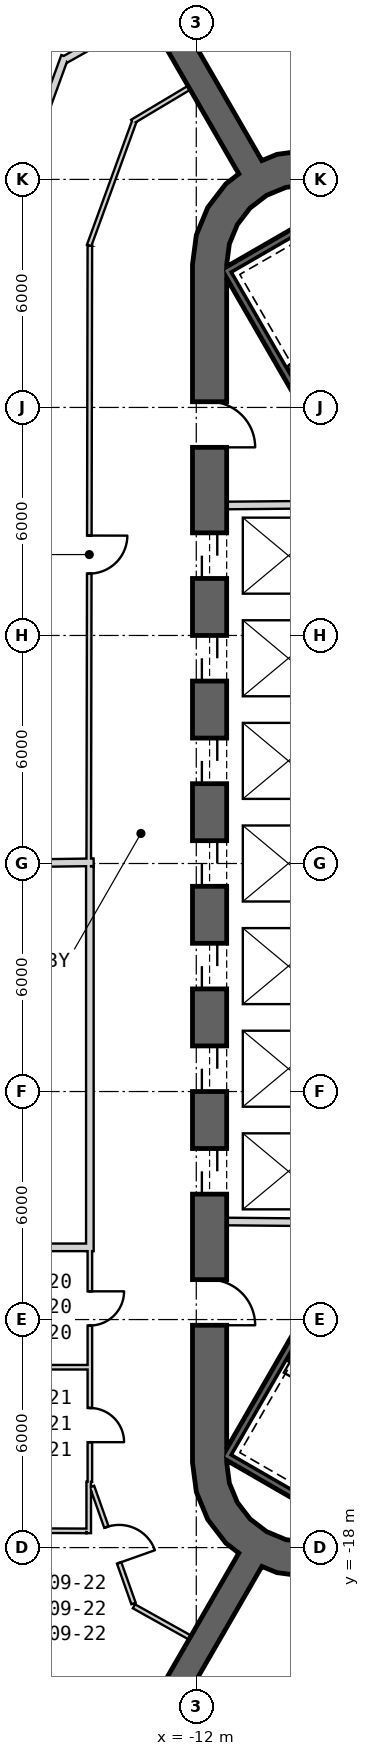
"""IFC4 building model, lengths in metres.
Left out: names, types, materials, properties, quantities, classifications, styles, units other than length and angle.
Written with IfcOpenShell. Run it as: python <this file> out.ifc"""

import sys

from ifc_helpers import new_model, si_unit, direction, frame, frame_2d, origin, place, context, subcontext, project, spatial, polyline, rectangle, outline, extrude, element, fill, save


model = new_model("IFC4")
c1 = context("Model", 3, precision=1e-05, world=origin(), true_north=direction((0.0, 1.0)))
c2 = subcontext(c1, "Body", "Model", "MODEL_VIEW")
j1 = project(units=[si_unit("LENGTHUNIT", "METRE"), si_unit("PLANEANGLEUNIT", "RADIAN")], contexts=[c1])
p1 = place(None, origin())
s1 = spatial("IfcSite", under=j1, at=p1, CompositionType="ELEMENT")
p2 = place(p1, origin())
s2 = spatial("IfcBuilding", under=s1, at=p2, CompositionType="ELEMENT")
p3 = place(p2, frame((0.0, 0.0, 169.2)))
s3 = spatial("IfcBuildingStorey", under=s2, at=p3, CompositionType="ELEMENT", Elevation=169.2)
p4 = place(p3, frame((-11.65, 15.762, 0.0), z_axis=(0.0, 0.0, 1.0), x_axis=(0.0, -1.0, 0.0)))
e1 = element("IfcWall", 1, at=p4, inside=s3, PredefinedType="SHEAR", context=c2, shape_type="SweptSolid", body=[
    extrude(rectangle(XDim=31.523, YDim=0.9, at=frame_2d((15.762, 0.0))), origin(), (0.0, 0.0, 1.0), 4.0),
])
p5 = place(p4, frame((7.062, 0.0, 0.0)))
e2 = element("IfcOpeningElement", 2, at=p5, cuts=e1, PredefinedType="OPENING", context=c2, shape_type="SweptSolid", body=[
    extrude(rectangle(XDim=1.2, YDim=2.4, at=frame_2d((0.6, 1.2))), frame((0.0, 0.46, 0.0), z_axis=(0.0, -1.0, 0.0), x_axis=(1.0, 0.0, 0.0)), (0.0, 0.0, 1.0), 0.92),
])
p6 = place(p4, frame((9.762, 0.0, 0.0)))
e3 = element("IfcOpeningElement", 3, at=p6, cuts=e1, PredefinedType="OPENING", context=c2, shape_type="SweptSolid", body=[
    extrude(rectangle(XDim=1.2, YDim=2.4, at=frame_2d((0.6, 1.2))), frame((0.0, 0.46, 0.0), z_axis=(0.0, -1.0, 0.0), x_axis=(1.0, 0.0, 0.0)), (0.0, 0.0, 1.0), 0.92),
])
p7 = place(p4, frame((12.462, 0.0, 0.0)))
e4 = element("IfcOpeningElement", 4, at=p7, cuts=e1, PredefinedType="OPENING", context=c2, shape_type="SweptSolid", body=[
    extrude(rectangle(XDim=1.2, YDim=2.4, at=frame_2d((0.6, 1.2))), frame((0.0, 0.46, 0.0), z_axis=(0.0, -1.0, 0.0), x_axis=(1.0, 0.0, 0.0)), (0.0, 0.0, 1.0), 0.92),
])
p8 = place(p4, frame((15.162, 0.0, 0.0)))
e5 = element("IfcOpeningElement", 5, at=p8, cuts=e1, PredefinedType="OPENING", context=c2, shape_type="SweptSolid", body=[
    extrude(rectangle(XDim=1.2, YDim=2.4, at=frame_2d((0.6, 1.2))), frame((0.0, 0.46, 0.0), z_axis=(0.0, -1.0, 0.0), x_axis=(1.0, 0.0, 0.0)), (0.0, 0.0, 1.0), 0.92),
])
p9 = place(p4, frame((17.862, 0.0, 0.0)))
e6 = element("IfcOpeningElement", 6, at=p9, cuts=e1, PredefinedType="OPENING", context=c2, shape_type="SweptSolid", body=[
    extrude(rectangle(XDim=1.2, YDim=2.4, at=frame_2d((0.6, 1.2))), frame((0.0, 0.46, 0.0), z_axis=(0.0, -1.0, 0.0), x_axis=(1.0, 0.0, 0.0)), (0.0, 0.0, 1.0), 0.92),
])
p10 = place(p4, frame((20.562, 0.0, 0.0)))
e7 = element("IfcOpeningElement", 7, at=p10, cuts=e1, PredefinedType="OPENING", context=c2, shape_type="SweptSolid", body=[
    extrude(rectangle(XDim=1.2, YDim=2.4, at=frame_2d((0.6, 1.2))), frame((0.0, 0.46, 0.0), z_axis=(0.0, -1.0, 0.0), x_axis=(1.0, 0.0, 0.0)), (0.0, 0.0, 1.0), 0.92),
])
p11 = place(p4, frame((23.262, 0.0, 0.0)))
e8 = element("IfcOpeningElement", 8, at=p11, cuts=e1, PredefinedType="OPENING", context=c2, shape_type="SweptSolid", body=[
    extrude(rectangle(XDim=1.2, YDim=2.4, at=frame_2d((0.6, 1.2))), frame((0.0, 0.46, 0.0), z_axis=(0.0, -1.0, 0.0), x_axis=(1.0, 0.0, 0.0)), (0.0, 0.0, 1.0), 0.92),
])
p12 = place(p4, frame((3.612, 0.0, 0.0)))
e9 = element("IfcOpeningElement", 9, at=p12, cuts=e1, PredefinedType="OPENING", context=c2, shape_type="SweptSolid", body=[
    extrude(rectangle(XDim=1.2, YDim=2.4, at=frame_2d((0.6, 1.2))), frame((0.0, 0.46, 0.0), z_axis=(0.0, -1.0, 0.0), x_axis=(1.0, 0.0, 0.0)), (0.0, 0.0, 1.0), 0.92),
])
p13 = place(p4, frame((26.712, 0.0, 0.0)))
e10 = element("IfcOpeningElement", 10, at=p13, cuts=e1, PredefinedType="OPENING", context=c2, shape_type="SweptSolid", body=[
    extrude(rectangle(XDim=1.2, YDim=2.4, at=frame_2d((0.6, 1.2))), frame((0.0, 0.46, 0.0), z_axis=(0.0, -1.0, 0.0), x_axis=(1.0, 0.0, 0.0)), (0.0, 0.0, 1.0), 0.92),
])
p14 = place(p3, origin())
e11 = element("IfcWall", 11, at=p14, inside=s3, PredefinedType="SHEAR", context=c2, shape_type="SweptSolid", body=[
    extrude(outline(polyline([(-7.6, 18.36), (-8.323, 18.659), (-9.1, 18.762), (-9.876, 18.659), (-10.6, 18.36), (-11.221, 17.883), (-11.698, 17.262), (-11.998, 16.538), (-12.1, 15.762), (-11.2, 15.762), (-11.128, 16.305), (-10.919, 16.812), (-10.585, 17.247), (-10.15, 17.58), (-9.644, 17.79), (-9.1, 17.862), (-8.556, 17.79), (-8.05, 17.58), (-7.6, 18.36)])), origin(), (0.0, 0.0, 1.0), 4.0),
])
p15 = place(p3, origin())
e12 = element("IfcWall", 12, at=p15, inside=s3, PredefinedType="SHEAR", context=c2, shape_type="SweptSolid", body=[
    extrude(outline(polyline([(-12.1, -15.762), (-11.998, -16.538), (-11.698, -17.262), (-11.221, -17.883), (-10.6, -18.36), (-9.876, -18.659), (-9.1, -18.762), (-8.323, -18.659), (-7.6, -18.36), (-8.05, -17.58), (-8.556, -17.79), (-9.1, -17.862), (-9.644, -17.79), (-10.15, -17.58), (-10.585, -17.247), (-10.919, -16.812), (-11.128, -16.305), (-11.2, -15.762), (-12.1, -15.762)])), origin(), (0.0, 0.0, 1.0), 4.0),
])
for number, where, z_axis, x_axis in (
    (13, (-10.575, 18.316, 0.0), (0.0, 0.0, 1.0), (-0.5, 0.866, 0.0)),
    (14, (-10.575, -18.316, 0.0), (0.0, 0.0, 1.0), (-0.5, -0.866, 0.0)),
):
    element("IfcWall", number, at=place(p3, frame(where, z_axis=z_axis, x_axis=x_axis)), inside=s3, PredefinedType="SHEAR", context=c2, shape_type="SweptSolid", body=[
        extrude(rectangle(XDim=12.433, YDim=0.7, at=frame_2d((6.216, 0.0))), origin(), (0.0, 0.0, 1.0), 4.0),
    ])
p16 = place(p3, frame((-11.2, 9.42, 0.0), z_axis=(0.0, 0.0, 1.0), x_axis=(0.999957167047, 0.009255488683, 0.0)))
e15 = element("IfcWall", 15, at=p16, inside=s3, PredefinedType="PLUMBINGWALL", context=c2, shape_type="SweptSolid", body=[
    extrude(rectangle(XDim=3.35, YDim=0.2, at=frame_2d((1.675, 0.0))), origin(), (0.0, 0.0, 1.0), 3.7),
])
p17 = place(p3, frame((-8.05, -9.449, 0.0), z_axis=(0.0, 0.0, 1.0), x_axis=(-0.999957467379, 0.009222983926, 0.0)))
e16 = element("IfcWall", 16, at=p17, inside=s3, PredefinedType="PLUMBINGWALL", context=c2, shape_type="SweptSolid", body=[
    extrude(rectangle(XDim=3.15, YDim=0.2, at=frame_2d((1.575, 0.0))), origin(), (0.0, 0.0, 1.0), 3.7),
])
p18 = place(p3, frame((-11.245, 15.678, -0.3), z_axis=(0.0, 0.0, 1.0), x_axis=(0.499977274689, -0.866038523851, 0.0)))
e17 = element("IfcWall", 17, at=p18, inside=s3, PredefinedType="SHEAR", context=c2, shape_type="SweptSolid", body=[
    extrude(rectangle(XDim=8.1, YDim=0.2, at=frame_2d((4.05, 0.0))), origin(), (0.0, 0.0, 1.0), 4.0),
])
for number, where, z_axis, x_axis in (
    (18, (-7.818, 17.541, -0.3), (0.0, 0.0, 1.0), (-0.866, -0.5, 0.0)),
    (19, (-11.282, -15.541, -0.3), (0.0, 0.0, 1.0), (0.866, -0.5, 0.0)),
):
    element("IfcWall", number, at=place(p3, frame(where, z_axis=z_axis, x_axis=x_axis)), inside=s3, PredefinedType="SHEAR", context=c2, shape_type="SweptSolid", body=[
        extrude(rectangle(XDim=3.8, YDim=0.2, at=frame_2d((1.9, 0.0))), origin(), (0.0, 0.0, 1.0), 4.0),
    ])
p19 = place(p3, frame((-7.196, -8.663, -0.3), z_axis=(0.0, 0.0, 1.0), x_axis=(-0.499997992926, -0.866026562566, 0.0)))
e20 = element("IfcWall", 20, at=p19, inside=s3, PredefinedType="SHEAR", context=c2, shape_type="SweptSolid", body=[
    extrude(rectangle(XDim=7.9, YDim=0.2, at=frame_2d((3.95, 0.0))), origin(), (0.0, 0.0, 1.0), 4.0),
])
p20 = place(p3, frame((-12.189, 20.411, 0.0), z_axis=(0.0, 0.0, 1.0), x_axis=(-0.858492721014, -0.51282574815, 0.0)))
e21 = element("IfcWall", 21, at=p20, inside=s3, PredefinedType="PARTITIONING", context=c2, shape_type="SweptSolid", body=[
    extrude(rectangle(XDim=1.742, YDim=0.12, at=frame_2d((0.871, 0.0))), origin(), (0.0, 0.0, 1.0), 3.7),
])
p21 = place(p3, frame((-13.631, 19.53, 0.0), z_axis=(0.0, 0.0, 1.0), x_axis=(-0.342069878069, -0.939674517329, 0.0)))
e22 = element("IfcWall", 22, at=p21, inside=s3, PredefinedType="PARTITIONING", context=c2, shape_type="SweptSolid", body=[
    extrude(rectangle(XDim=3.479, YDim=0.12, at=frame_2d((1.739, 0.0))), origin(), (0.0, 0.0, 1.0), 2.78),
])
p22 = place(p3, frame((-14.8, 16.257, 0.0), z_axis=(0.0, 0.0, 1.0), x_axis=(-0.001847148781, -0.999998294019, 0.0)))
e23 = element("IfcWall", 23, at=p22, inside=s3, PredefinedType="PARTITIONING", context=c2, shape_type="SweptSolid", body=[
    extrude(rectangle(XDim=16.257, YDim=0.12, at=frame_2d((8.128, 0.0))), origin(), (0.0, 0.0, 1.0), 2.88),
])
p23 = place(p22, frame((7.629, 0.0, 0.0)))
e24 = element("IfcOpeningElement", 24, at=p23, cuts=e23, PredefinedType="OPENING", context=c2, shape_type="SweptSolid", body=[
    extrude(rectangle(XDim=1.0, YDim=2.1, at=frame_2d((0.5, 1.05))), frame((0.0, 0.07, 0.0), z_axis=(0.0, -1.0, 0.0), x_axis=(1.0, 0.0, 0.0)), (0.0, 0.0, 1.0), 0.14),
])
p24 = place(p3, frame((-14.8, -10.13, 0.0), z_axis=(0.0, 0.0, 1.0), x_axis=(0.0, -1.0, 0.0)))
e25 = element("IfcWall", 25, at=p24, inside=s3, PredefinedType="PARTITIONING", context=c2, shape_type="SweptSolid", body=[
    extrude(rectangle(XDim=6.138, YDim=0.12, at=frame_2d((3.069, 0.0))), origin(), (0.0, 0.0, 1.0), 2.88),
])
p25 = place(p24, frame((1.127, 0.0, 0.0)))
e26 = element("IfcOpeningElement", 26, at=p25, cuts=e25, PredefinedType="OPENING", context=c2, shape_type="SweptSolid", body=[
    extrude(rectangle(XDim=0.9, YDim=2.1, at=frame_2d((0.45, 1.05))), frame((0.0, 0.07, 0.0), z_axis=(0.0, -1.0, 0.0), x_axis=(1.0, 0.0, 0.0)), (0.0, 0.0, 1.0), 0.14),
])
p26 = place(p24, frame((4.196, 0.0, 0.0)))
e27 = element("IfcOpeningElement", 27, at=p26, cuts=e25, PredefinedType="OPENING", context=c2, shape_type="SweptSolid", body=[
    extrude(rectangle(XDim=0.9, YDim=2.1, at=frame_2d((0.45, 1.05))), frame((0.0, 0.07, 0.0), z_axis=(0.0, -1.0, 0.0), x_axis=(1.0, 0.0, 0.0)), (0.0, 0.0, 1.0), 0.14),
])
p27 = place(p3, frame((-17.2, -0.001, 0.0), z_axis=(0.0, 0.0, 1.0), x_axis=(0.999915662945, 0.012987185857, 0.0)))
e28 = element("IfcWall", 28, at=p27, inside=s3, PredefinedType="PARTITIONING", context=c2, shape_type="SweptSolid", body=[
    extrude(rectangle(XDim=2.5, YDim=0.2, at=frame_2d((1.25, 0.0))), origin(), (0.0, 0.0, 1.0), 3.07),
])
p28 = place(p3, frame((-15.456, 21.239, 0.0), z_axis=(0.0, 0.0, 1.0), x_axis=(-0.34205546997, -0.939679762187, 0.0)))
e29 = element("IfcWall", 29, at=p28, inside=s3, PredefinedType="PARTITIONING", context=c2, shape_type="SweptSolid", body=[
    extrude(rectangle(XDim=4.706, YDim=0.2, at=frame_2d((2.353, 0.0))), origin(), (0.0, 0.0, 1.0), 2.78),
])
p29 = place(p3, frame((-13.313, 22.359, 0.0), z_axis=(0.0, 0.0, 1.0), x_axis=(-0.87121710687, -0.490897904555, 0.0)))
e30 = element("IfcWall", 30, at=p29, inside=s3, PredefinedType="PARTITIONING", context=c2, shape_type="SweptSolid", body=[
    extrude(rectangle(XDim=2.457, YDim=0.2, at=frame_2d((1.229, 0.0))), origin(), (0.0, 0.0, 1.0), 3.7),
])
p30 = place(p3, frame((-14.8, -0.07, 0.0), z_axis=(0.0, 0.0, 1.0), x_axis=(0.0, -1.0, 0.0)))
e31 = element("IfcWall", 31, at=p30, inside=s3, PredefinedType="PARTITIONING", context=c2, shape_type="SweptSolid", body=[
    extrude(rectangle(XDim=10.13, YDim=0.2, at=frame_2d((5.065, 0.0))), origin(), (0.0, 0.0, 1.0), 2.98),
])
p31 = place(p3, frame((-13.641, -19.544, 0.0), z_axis=(0.0, 0.0, 1.0), x_axis=(0.873339078614, -0.487112773149, 0.0)))
e32 = element("IfcWall", 32, at=p31, inside=s3, PredefinedType="PARTITIONING", context=c2, shape_type="SweptSolid", body=[
    extrude(rectangle(XDim=1.692, YDim=0.12, at=frame_2d((0.846, 0.0))), origin(), (0.0, 0.0, 1.0), 3.7),
])
p32 = place(p3, frame((-14.743, -16.394, 0.0), z_axis=(0.0, 0.0, 1.0), x_axis=(0.334279115597, -0.942474123186, 0.0)))
e33 = element("IfcWall", 33, at=p32, inside=s3, PredefinedType="PARTITIONING", context=c2, shape_type="SweptSolid", body=[
    extrude(rectangle(XDim=3.264, YDim=0.12, at=frame_2d((1.632, 0.0))), origin(), (0.0, 0.0, 1.0), 2.78),
])
p33 = place(p32, frame((1.132, 0.0, 0.0)))
e34 = element("IfcOpeningElement", 34, at=p33, cuts=e33, PredefinedType="OPENING", context=c2, shape_type="SweptSolid", body=[
    extrude(rectangle(XDim=1.0, YDim=2.1, at=frame_2d((0.5, 1.05))), frame((0.0, 0.07, 0.0), z_axis=(0.0, -1.0, 0.0), x_axis=(1.0, 0.0, 0.0)), (0.0, 0.0, 1.0), 0.14),
])
p34 = place(p3, frame((-14.9, -10.1, 0.0), z_axis=(0.0, 0.0, 1.0), x_axis=(-1.0, 0.0, 0.0)))
e35 = element("IfcWall", 35, at=p34, inside=s3, PredefinedType="PARTITIONING", context=c2, shape_type="SweptSolid", body=[
    extrude(rectangle(XDim=6.88, YDim=0.2, at=frame_2d((3.44, 0.0))), origin(), (0.0, 0.0, 1.0), 2.98),
])
p35 = place(p3, frame((-14.83, -13.254, 0.0), z_axis=(0.0, 0.0, 1.0), x_axis=(-1.0, 0.0, 0.0)))
e36 = element("IfcWall", 36, at=p35, inside=s3, PredefinedType="PARTITIONING", context=c2, shape_type="SweptSolid", body=[
    extrude(rectangle(XDim=6.75, YDim=0.12, at=frame_2d((3.375, 0.0))), origin(), (0.0, 0.0, 1.0), 2.88),
])
p36 = place(p3, frame((-14.83, -17.621, 0.0), z_axis=(0.0, 0.0, 1.0), x_axis=(0.0, 1.0, 0.0)))
e37 = element("IfcWall", 37, at=p36, inside=s3, PredefinedType="PARTITIONING", context=c2, shape_type="SweptSolid", body=[
    extrude(rectangle(XDim=1.352, YDim=0.12, at=frame_2d((0.676, 0.0))), origin(), (0.0, 0.0, 1.0), 2.78),
])
p37 = place(p3, frame((-14.89, -17.56, 0.0), z_axis=(0.0, 0.0, 1.0), x_axis=(-0.999990411956, 0.004379040595, 0.0)))
e38 = element("IfcWall", 38, at=p37, inside=s3, PredefinedType="PARTITIONING", context=c2, shape_type="SweptSolid", body=[
    extrude(rectangle(XDim=6.69, YDim=0.12, at=frame_2d((3.345, 0.0))), origin(), (0.0, 0.0, 1.0), 2.88),
])
p38 = place(p23, origin())
e39 = element("IfcDoor", 39, at=p38, inside=s3, OperationType="SINGLE_SWING_LEFT", PredefinedType="NOTDEFINED", context=c2, shape_type="SweptSolid", body=[
    extrude(rectangle(XDim=1.0, YDim=2.1, at=frame_2d((0.5, 1.05))), frame((0.0, 0.025, 0.0), z_axis=(0.0, -1.0, 0.0), x_axis=(1.0, 0.0, 0.0)), (0.0, 0.0, 1.0), 0.05),
])
fill(e24, e39)
p39 = place(p25, origin())
e40 = element("IfcDoor", 40, at=p39, inside=s3, OperationType="SINGLE_SWING_LEFT", PredefinedType="NOTDEFINED", context=c2, shape_type="SweptSolid", body=[
    extrude(rectangle(XDim=0.9, YDim=2.1, at=frame_2d((0.45, 1.05))), frame((0.0, 0.025, 0.0), z_axis=(0.0, -1.0, 0.0), x_axis=(1.0, 0.0, 0.0)), (0.0, 0.0, 1.0), 0.05),
])
fill(e26, e40)
p40 = place(p26, origin())
e41 = element("IfcDoor", 41, at=p40, inside=s3, OperationType="SINGLE_SWING_RIGHT", PredefinedType="NOTDEFINED", context=c2, shape_type="SweptSolid", body=[
    extrude(rectangle(XDim=0.9, YDim=2.1, at=frame_2d((0.45, 1.05))), frame((0.0, 0.025, 0.0), z_axis=(0.0, -1.0, 0.0), x_axis=(1.0, 0.0, 0.0)), (0.0, 0.0, 1.0), 0.05),
])
fill(e27, e41)
p41 = place(p33, origin())
e42 = element("IfcDoor", 42, at=p41, inside=s3, OperationType="SINGLE_SWING_RIGHT", PredefinedType="NOTDEFINED", context=c2, shape_type="SweptSolid", body=[
    extrude(rectangle(XDim=1.0, YDim=2.1, at=frame_2d((0.5, 1.05))), frame((0.0, 0.025, 0.0), z_axis=(0.0, -1.0, 0.0), x_axis=(1.0, 0.0, 0.0)), (0.0, 0.0, 1.0), 0.05),
])
fill(e34, e42)
p42 = place(p5, origin())
e43 = element("IfcDoor", 43, at=p42, inside=s3, OperationType="SLIDING_TO_LEFT", PredefinedType="USERDEFINED", context=c2, shape_type="SweptSolid", body=[
    extrude(rectangle(XDim=1.2, YDim=2.4, at=frame_2d((0.6, 1.2))), frame((0.0, 0.025, 0.0), z_axis=(0.0, -1.0, 0.0), x_axis=(1.0, 0.0, 0.0)), (0.0, 0.0, 1.0), 0.05),
])
fill(e2, e43)
p43 = place(p6, origin())
e44 = element("IfcDoor", 44, at=p43, inside=s3, OperationType="SLIDING_TO_LEFT", PredefinedType="USERDEFINED", context=c2, shape_type="SweptSolid", body=[
    extrude(rectangle(XDim=1.2, YDim=2.4, at=frame_2d((0.6, 1.2))), frame((0.0, 0.025, 0.0), z_axis=(0.0, -1.0, 0.0), x_axis=(1.0, 0.0, 0.0)), (0.0, 0.0, 1.0), 0.05),
])
fill(e3, e44)
p44 = place(p7, origin())
e45 = element("IfcDoor", 45, at=p44, inside=s3, OperationType="SLIDING_TO_LEFT", PredefinedType="USERDEFINED", context=c2, shape_type="SweptSolid", body=[
    extrude(rectangle(XDim=1.2, YDim=2.4, at=frame_2d((0.6, 1.2))), frame((0.0, 0.025, 0.0), z_axis=(0.0, -1.0, 0.0), x_axis=(1.0, 0.0, 0.0)), (0.0, 0.0, 1.0), 0.05),
])
fill(e4, e45)
p45 = place(p8, origin())
e46 = element("IfcDoor", 46, at=p45, inside=s3, OperationType="SLIDING_TO_LEFT", PredefinedType="USERDEFINED", context=c2, shape_type="SweptSolid", body=[
    extrude(rectangle(XDim=1.2, YDim=2.4, at=frame_2d((0.6, 1.2))), frame((0.0, 0.025, 0.0), z_axis=(0.0, -1.0, 0.0), x_axis=(1.0, 0.0, 0.0)), (0.0, 0.0, 1.0), 0.05),
])
fill(e5, e46)
p46 = place(p9, origin())
e47 = element("IfcDoor", 47, at=p46, inside=s3, OperationType="SLIDING_TO_LEFT", PredefinedType="USERDEFINED", context=c2, shape_type="SweptSolid", body=[
    extrude(rectangle(XDim=1.2, YDim=2.4, at=frame_2d((0.6, 1.2))), frame((0.0, 0.025, 0.0), z_axis=(0.0, -1.0, 0.0), x_axis=(1.0, 0.0, 0.0)), (0.0, 0.0, 1.0), 0.05),
])
fill(e6, e47)
p47 = place(p10, origin())
e48 = element("IfcDoor", 48, at=p47, inside=s3, OperationType="SLIDING_TO_LEFT", PredefinedType="USERDEFINED", context=c2, shape_type="SweptSolid", body=[
    extrude(rectangle(XDim=1.2, YDim=2.4, at=frame_2d((0.6, 1.2))), frame((0.0, 0.025, 0.0), z_axis=(0.0, -1.0, 0.0), x_axis=(1.0, 0.0, 0.0)), (0.0, 0.0, 1.0), 0.05),
])
fill(e7, e48)
p48 = place(p11, origin())
e49 = element("IfcDoor", 49, at=p48, inside=s3, OperationType="SLIDING_TO_LEFT", PredefinedType="USERDEFINED", context=c2, shape_type="SweptSolid", body=[
    extrude(rectangle(XDim=1.2, YDim=2.4, at=frame_2d((0.6, 1.2))), frame((0.0, 0.025, 0.0), z_axis=(0.0, -1.0, 0.0), x_axis=(1.0, 0.0, 0.0)), (0.0, 0.0, 1.0), 0.05),
])
fill(e8, e49)
p49 = place(p12, origin())
e50 = element("IfcDoor", 50, at=p49, inside=s3, OperationType="SINGLE_SWING_RIGHT", PredefinedType="USERDEFINED", context=c2, shape_type="SweptSolid", body=[
    extrude(rectangle(XDim=1.2, YDim=2.4, at=frame_2d((0.6, 1.2))), frame((0.0, 0.025, 0.0), z_axis=(0.0, -1.0, 0.0), x_axis=(1.0, 0.0, 0.0)), (0.0, 0.0, 1.0), 0.05),
])
fill(e9, e50)
p50 = place(p13, origin())
e51 = element("IfcDoor", 51, at=p50, inside=s3, OperationType="SINGLE_SWING_RIGHT", PredefinedType="USERDEFINED", context=c2, shape_type="SweptSolid", body=[
    extrude(rectangle(XDim=1.2, YDim=2.4, at=frame_2d((0.6, 1.2))), frame((0.0, 0.025, 0.0), z_axis=(0.0, -1.0, 0.0), x_axis=(1.0, 0.0, 0.0)), (0.0, 0.0, 1.0), 0.05),
])
fill(e10, e51)
save(model, sys.argv[1])
